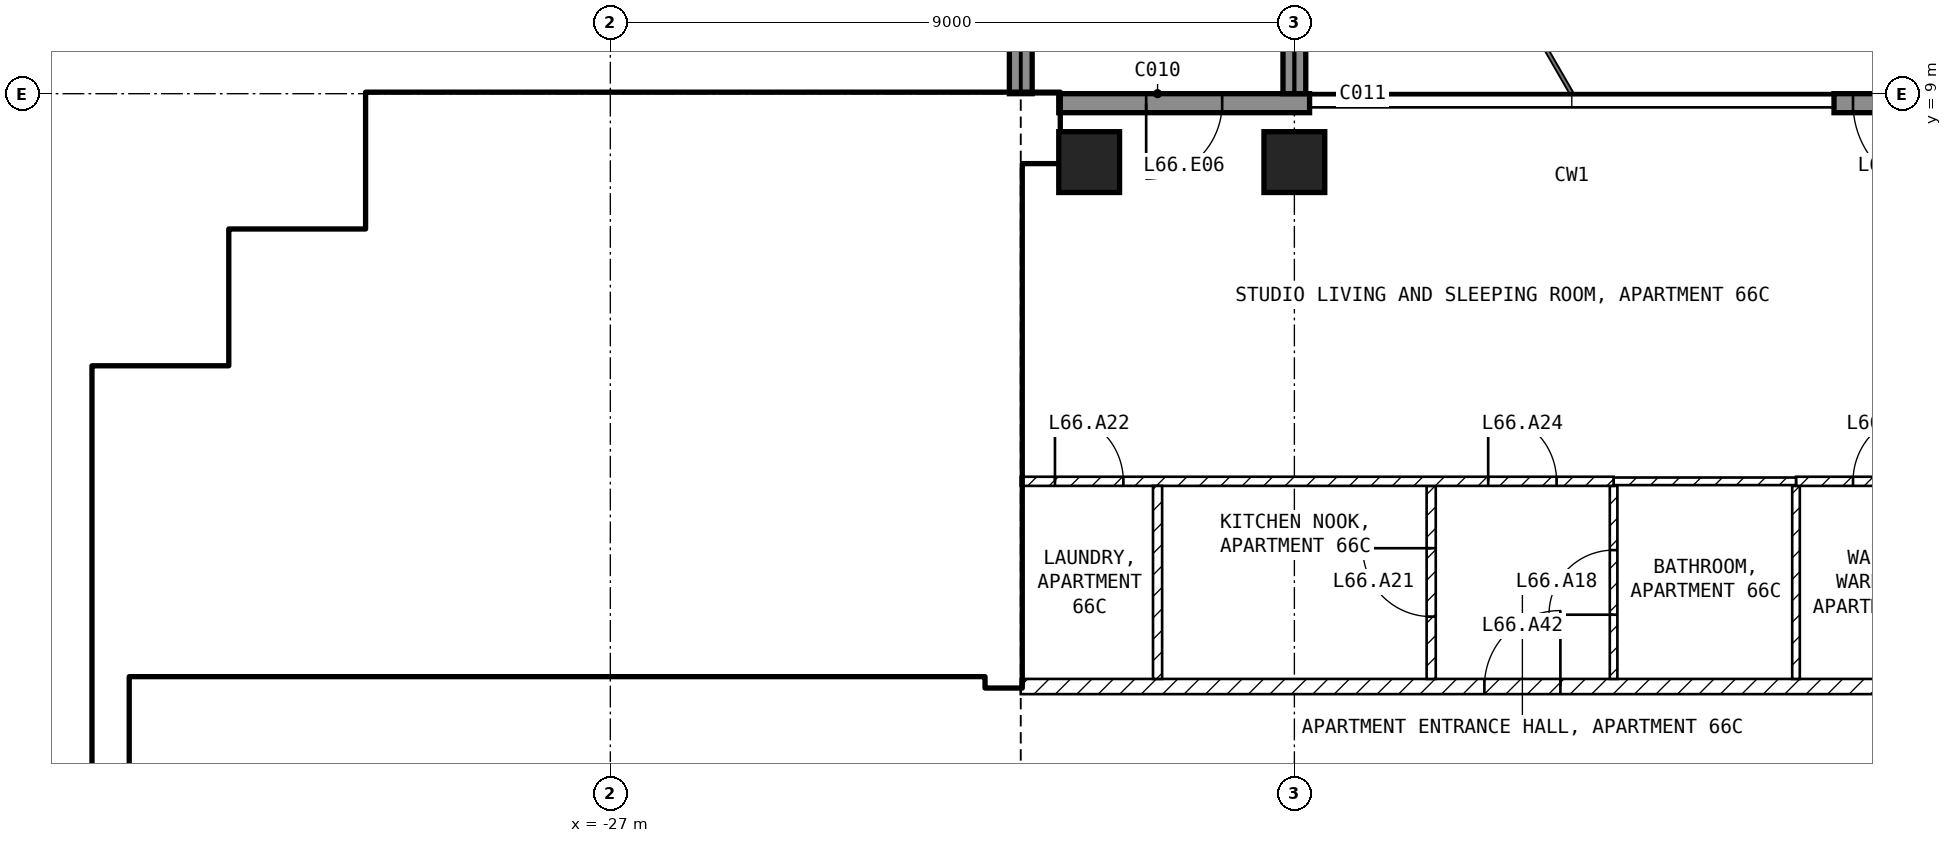
"""IFC4 building model, lengths in metres.
Left out: names, types, materials, properties, quantities, classifications, styles, units other than length and angle.
Written with IfcOpenShell. Run it as: python <this file> out.ifc"""

import sys

from ifc_helpers import new_model, si_unit, direction, frame, frame_2d, origin, origin_2d, place, context, subcontext, project, spatial, rectangle, extrude, element, fill, save


model = new_model("IFC4")
c1 = context("Model", 3, precision=1e-05, world=origin(), true_north=direction((0.0, 1.0)))
c2 = subcontext(c1, "Body", "Model", "MODEL_VIEW")
j1 = project(units=[si_unit("LENGTHUNIT", "METRE"), si_unit("PLANEANGLEUNIT", "RADIAN")], contexts=[c1])
p1 = place(None, origin())
s1 = spatial("IfcSite", under=j1, at=p1, CompositionType="ELEMENT")
p2 = place(p1, origin())
s2 = spatial("IfcBuilding", under=s1, at=p2, CompositionType="ELEMENT")
p3 = place(p2, frame((0.0, 0.0, 260.5)))
s3 = spatial("IfcBuildingStorey", under=s2, at=p3, CompositionType="ELEMENT", Elevation=260.5)
for number, where, z_axis, x_axis in (
    (1, (-20.7, 8.1, -0.25), (0.0, 0.0, 1.0), (1.0, 0.0, 0.0)),
    (2, (-18.0, 8.1, -0.25), (0.0, 0.0, 1.0), (1.0, 0.0, 0.0)),
):
    element("IfcColumn", number, at=place(p3, frame(where, z_axis=z_axis, x_axis=x_axis)), inside=s3, PredefinedType="COLUMN", context=c2, shape_type="SweptSolid", body=[
        extrude(rectangle(XDim=0.8, YDim=0.8, at=origin_2d()), origin(), (0.0, 0.0, 1.0), 3.5),
    ])
p4 = place(p3, frame((-9.06, 8.875, 0.0), z_axis=(0.0, 0.0, 1.0), x_axis=(-1.0, 0.0, 0.0)))
e3 = element("IfcWall", 3, at=p4, inside=s3, PredefinedType="SOLIDWALL", context=c2, shape_type="SweptSolid", body=[
    extrude(rectangle(XDim=1.84, YDim=0.25, at=frame_2d((0.92, 0.0))), origin(), (0.0, 0.0, 1.0), 3.25),
])
p5 = place(p4, frame((0.39, 0.0, 0.0)))
e4 = element("IfcOpeningElement", 4, at=p5, cuts=e3, PredefinedType="OPENING", context=c2, shape_type="SweptSolid", body=[
    extrude(rectangle(XDim=1.2, YDim=2.4, at=frame_2d((0.6, 1.2))), frame((0.0, 0.135, 0.0), z_axis=(0.0, -1.0, 0.0), x_axis=(1.0, 0.0, 0.0)), (0.0, 0.0, 1.0), 0.27),
])
p6 = place(p3, frame((-17.8, 8.875, 0.0), z_axis=(0.0, 0.0, 1.0), x_axis=(-1.0, 0.0, 0.0)))
e5 = element("IfcWall", 5, at=p6, inside=s3, PredefinedType="SOLIDWALL", context=c2, shape_type="SweptSolid", body=[
    extrude(rectangle(XDim=3.3, YDim=0.25, at=frame_2d((1.65, 0.0))), origin(), (0.0, 0.0, 1.0), 3.25),
])
p7 = place(p6, frame((1.15, 0.0, 0.0)))
e6 = element("IfcOpeningElement", 6, at=p7, cuts=e5, PredefinedType="OPENING", context=c2, shape_type="SweptSolid", body=[
    extrude(rectangle(XDim=1.0, YDim=2.4, at=frame_2d((0.5, 1.2))), frame((0.0, 0.135, 0.0), z_axis=(0.0, -1.0, 0.0), x_axis=(1.0, 0.0, 0.0)), (0.0, 0.0, 1.0), 0.27),
])
for number, where, z_axis, x_axis in (
    (7, (-21.6, 9.0, 0.0), (0.0, 0.0, 1.0), (0.0, 1.0, 0.0)),
    (8, (-18.0, 9.0, 0.0), (0.0, 0.0, 1.0), (0.0, 1.0, 0.0)),
):
    element("IfcWall", number, at=place(p3, frame(where, z_axis=z_axis, x_axis=x_axis)), inside=s3, PredefinedType="SOLIDWALL", context=c2, shape_type="SweptSolid", body=[
        extrude(rectangle(XDim=2.7, YDim=0.3, at=frame_2d((1.35, 0.0))), origin(), (0.0, 0.0, 1.0), 3.25),
    ])
p8 = place(p3, frame((-33.575, -4.95, 0.0), z_axis=(0.0, 0.0, 1.0), x_axis=(0.0, 1.0, 0.0)))
e9 = element("IfcWall", 9, at=p8, inside=s3, PredefinedType="SHEAR", context=c2, shape_type="SweptSolid", body=[
    extrude(rectangle(XDim=10.35, YDim=0.45, at=frame_2d((5.175, 0.0))), origin(), (0.0, 0.0, 1.0), 3.25),
])
for number, where, z_axis, x_axis in (
    (10, (-33.35, 5.175, 0.0), (0.0, 0.0, 1.0), (1.0, 0.0, 0.0)),
    (11, (-31.775, 5.4, 0.0), (0.0, 0.0, 1.0), (0.0, 1.0, 0.0)),
    (12, (-31.55, 6.975, 0.0), (0.0, 0.0, 1.0), (1.0, 0.0, 0.0)),
    (13, (-29.975, 7.2, 0.0), (0.0, 0.0, 1.0), (0.0, 1.0, 0.0)),
):
    element("IfcWall", number, at=place(p3, frame(where, z_axis=z_axis, x_axis=x_axis)), inside=s3, PredefinedType="SHEAR", context=c2, shape_type="SweptSolid", body=[
        extrude(rectangle(XDim=1.8, YDim=0.45, at=frame_2d((0.9, 0.0))), origin(), (0.0, 0.0, 1.0), 3.25),
    ])
p9 = place(p3, frame((-29.75, 8.55, 0.0), z_axis=(0.0, 0.0, 1.0), x_axis=(1.0, 0.0, 0.0)))
e14 = element("IfcWall", 14, at=p9, inside=s3, PredefinedType="SHEAR", context=c2, shape_type="SweptSolid", body=[
    extrude(rectangle(XDim=8.65, YDim=0.9, at=frame_2d((4.325, 0.0))), origin(), (0.0, 0.0, 1.0), 3.25),
])
p10 = place(p3, frame((-21.825, 1.2, 0.0), z_axis=(0.0, 0.0, 1.0), x_axis=(0.0, 1.0, 0.0)))
e15 = element("IfcWall", 15, at=p10, inside=s3, PredefinedType="SHEAR", context=c2, shape_type="SweptSolid", body=[
    extrude(rectangle(XDim=6.9, YDim=0.45, at=frame_2d((3.45, 0.0))), origin(), (0.0, 0.0, 1.0), 3.25),
])
p11 = place(p3, frame((-33.35, 1.45, 0.0), z_axis=(0.0, 0.0, 1.0), x_axis=(1.0, 0.0, 0.0)))
e16 = element("IfcWall", 16, at=p11, inside=s3, PredefinedType="SOLIDWALL", context=c2, shape_type="SweptSolid", body=[
    extrude(rectangle(XDim=11.3, YDim=0.2, at=frame_2d((5.65, 0.0))), origin(), (0.0, 0.0, 1.0), 3.25),
])
p12 = place(p11, frame((9.55, 0.0, 0.0)))
e17 = element("IfcOpeningElement", 17, at=p12, cuts=e16, PredefinedType="OPENING", context=c2, shape_type="SweptSolid", body=[
    extrude(rectangle(XDim=1.0, YDim=2.1, at=frame_2d((0.5, 1.05))), frame((0.0, 0.11, 0.0), z_axis=(0.0, -1.0, 0.0), x_axis=(1.0, 0.0, 0.0)), (0.0, 0.0, 1.0), 0.22),
])
p13 = place(p11, frame((7.05, 0.0, 0.0)))
e18 = element("IfcOpeningElement", 18, at=p13, cuts=e16, PredefinedType="OPENING", context=c2, shape_type="SweptSolid", body=[
    extrude(rectangle(XDim=1.0, YDim=2.1, at=frame_2d((0.5, 1.05))), frame((0.0, 0.11, 0.0), z_axis=(0.0, -1.0, 0.0), x_axis=(1.0, 0.0, 0.0)), (0.0, 0.0, 1.0), 0.22),
])
p14 = place(p11, frame((1.175, 0.0, 0.0)))
e19 = element("IfcOpeningElement", 19, at=p14, cuts=e16, PredefinedType="OPENING", context=c2, shape_type="SweptSolid", body=[
    extrude(rectangle(XDim=0.9, YDim=2.1, at=frame_2d((0.45, 1.05))), frame((0.0, 0.11, 0.0), z_axis=(0.0, -1.0, 0.0), x_axis=(1.0, 0.0, 0.0)), (0.0, 0.0, 1.0), 0.22),
])
p15 = place(p3, frame((-28.35, 5.15, 0.0), z_axis=(0.0, 0.0, 1.0), x_axis=(1.0, 0.0, 0.0)))
e20 = element("IfcWall", 20, at=p15, inside=s3, PredefinedType="SOLIDWALL", context=c2, shape_type="SweptSolid", body=[
    extrude(rectangle(XDim=6.3, YDim=0.2, at=frame_2d((3.15, 0.0))), origin(), (0.0, 0.0, 1.0), 3.25),
])
p16 = place(p15, frame((5.1, 0.0, 0.0)))
e21 = element("IfcOpeningElement", 21, at=p16, cuts=e20, PredefinedType="OPENING", context=c2, shape_type="SweptSolid", body=[
    extrude(rectangle(XDim=1.0, YDim=2.1, at=frame_2d((0.5, 1.05))), frame((0.0, 0.11, 0.0), z_axis=(0.0, -1.0, 0.0), x_axis=(1.0, 0.0, 0.0)), (0.0, 0.0, 1.0), 0.22),
])
p17 = place(p3, frame((-28.25, 5.25, 0.0), z_axis=(0.0, 0.0, 1.0), x_axis=(0.0, 1.0, 0.0)))
e22 = element("IfcWall", 22, at=p17, inside=s3, PredefinedType="SOLIDWALL", context=c2, shape_type="SweptSolid", body=[
    extrude(rectangle(XDim=2.85, YDim=0.2, at=frame_2d((1.425, 0.0))), origin(), (0.0, 0.0, 1.0), 3.25),
])
p18 = place(p3, frame((-33.35, 3.95, 0.0), z_axis=(0.0, 0.0, 1.0), x_axis=(1.0, 0.0, 0.0)))
e23 = element("IfcWall", 23, at=p18, inside=s3, PredefinedType="SOLIDWALL", context=c2, shape_type="SweptSolid", body=[
    extrude(rectangle(XDim=6.15, YDim=0.2, at=frame_2d((3.075, 0.0))), origin(), (0.0, 0.0, 1.0), 3.25),
])
p19 = place(p3, frame((-27.1, 1.55, 0.0), z_axis=(0.0, 0.0, 1.0), x_axis=(0.0, 1.0, 0.0)))
e24 = element("IfcWall", 24, at=p19, inside=s3, PredefinedType="SOLIDWALL", context=c2, shape_type="SweptSolid", body=[
    extrude(rectangle(XDim=3.5, YDim=0.2, at=frame_2d((1.75, 0.0))), origin(), (0.0, 0.0, 1.0), 3.25),
])
p20 = place(p19, frame((0.6, 0.0, 0.0)))
e25 = element("IfcOpeningElement", 25, at=p20, cuts=e24, PredefinedType="OPENING", context=c2, shape_type="SweptSolid", body=[
    extrude(rectangle(XDim=1.1, YDim=2.1, at=frame_2d((0.55, 1.05))), frame((0.0, 0.11, 0.0), z_axis=(0.0, -1.0, 0.0), x_axis=(1.0, 0.0, 0.0)), (0.0, 0.0, 1.0), 0.22),
])
p21 = place(p19, frame((2.6, 0.0, 0.0)))
e26 = element("IfcOpeningElement", 26, at=p21, cuts=e24, PredefinedType="OPENING", context=c2, shape_type="SweptSolid", body=[
    extrude(rectangle(XDim=0.8, YDim=2.1, at=frame_2d((0.4, 1.05))), frame((0.0, 0.11, 0.0), z_axis=(0.0, -1.0, 0.0), x_axis=(1.0, 0.0, 0.0)), (0.0, 0.0, 1.0), 0.22),
])
p22 = place(p3, frame((-30.0, 1.55, 0.0), z_axis=(0.0, 0.0, 1.0), x_axis=(0.0, 1.0, 0.0)))
e27 = element("IfcWall", 27, at=p22, inside=s3, PredefinedType="SOLIDWALL", context=c2, shape_type="SweptSolid", body=[
    extrude(rectangle(XDim=2.3, YDim=0.2, at=frame_2d((1.15, 0.0))), origin(), (0.0, 0.0, 1.0), 3.25),
])
p23 = place(p3, frame((-29.0, 4.05, 0.0), z_axis=(0.0, 0.0, 1.0), x_axis=(0.0, 1.0, 0.0)))
e28 = element("IfcWall", 28, at=p23, inside=s3, PredefinedType="PARTITIONING", context=c2, shape_type="SweptSolid", body=[
    extrude(rectangle(XDim=4.05, YDim=0.15, at=frame_2d((2.025, 0.0))), origin(), (0.0, 0.0, 1.0), 3.25),
])
p24 = place(p23, frame((0.1, 0.0, 0.0)))
e29 = element("IfcOpeningElement", 29, at=p24, cuts=e28, PredefinedType="OPENING", context=c2, shape_type="SweptSolid", body=[
    extrude(rectangle(XDim=0.8, YDim=2.1, at=frame_2d((0.4, 1.05))), frame((0.0, 0.085, 0.0), z_axis=(0.0, -1.0, 0.0), x_axis=(1.0, 0.0, 0.0)), (0.0, 0.0, 1.0), 0.17),
])
p25 = place(p3, frame((-21.6, 1.2, 0.0), z_axis=(0.0, 0.0, 1.0), x_axis=(1.0, 0.0, 0.0)))
e30 = element("IfcWall", 30, at=p25, inside=s3, PredefinedType="PARTITIONING", context=c2, shape_type="SweptSolid", body=[
    extrude(rectangle(XDim=17.2, YDim=0.2, at=frame_2d((8.6, 0.0))), origin(), (0.0, 0.0, 1.0), 3.25),
])
p26 = place(p25, frame((6.1, 0.0, 0.0)))
e31 = element("IfcOpeningElement", 31, at=p26, cuts=e30, PredefinedType="OPENING", context=c2, shape_type="SweptSolid", body=[
    extrude(rectangle(XDim=1.0, YDim=2.1, at=frame_2d((0.5, 1.05))), frame((0.0, 0.11, 0.0), z_axis=(0.0, -1.0, 0.0), x_axis=(1.0, 0.0, 0.0)), (0.0, 0.0, 1.0), 0.22),
])
p27 = place(p3, frame((-11.4, 1.3, 0.0), z_axis=(0.0, 0.0, 1.0), x_axis=(0.0, 1.0, 0.0)))
e32 = element("IfcWall", 32, at=p27, inside=s3, PredefinedType="PARTITIONING", context=c2, shape_type="SweptSolid", body=[
    extrude(rectangle(XDim=2.54, YDim=0.1, at=frame_2d((1.27, 0.0))), origin(), (0.0, 0.0, 1.0), 3.25),
])
p28 = place(p3, frame((-11.4, 3.9, 0.0), z_axis=(0.0, 0.0, 1.0), x_axis=(1.0, 0.0, 0.0)))
e33 = element("IfcWall", 33, at=p28, inside=s3, PredefinedType="PARTITIONING", context=c2, shape_type="SweptSolid", body=[
    extrude(rectangle(XDim=2.46, YDim=0.12, at=frame_2d((1.23, 0.0))), origin(), (0.0, 0.0, 1.0), 3.25),
])
p29 = place(p28, frame((0.75, 0.0, 0.0)))
e34 = element("IfcOpeningElement", 34, at=p29, cuts=e33, PredefinedType="OPENING", context=c2, shape_type="SweptSolid", body=[
    extrude(rectangle(XDim=0.9, YDim=2.1, at=frame_2d((0.45, 1.05))), frame((0.0, 0.07, 0.0), z_axis=(0.0, -1.0, 0.0), x_axis=(1.0, 0.0, 0.0)), (0.0, 0.0, 1.0), 0.14),
])
p30 = place(p3, frame((-13.8, 1.3, 0.0), z_axis=(0.0, 0.0, 1.0), x_axis=(0.0, 1.0, 0.0)))
e35 = element("IfcWall", 35, at=p30, inside=s3, PredefinedType="PARTITIONING", context=c2, shape_type="SweptSolid", body=[
    extrude(rectangle(XDim=2.54, YDim=0.1, at=frame_2d((1.27, 0.0))), origin(), (0.0, 0.0, 1.0), 3.25),
])
p31 = place(p30, frame((0.845, 0.0, 0.0)))
e36 = element("IfcOpeningElement", 36, at=p31, cuts=e35, PredefinedType="OPENING", context=c2, shape_type="SweptSolid", body=[
    extrude(rectangle(XDim=0.85, YDim=2.1, at=frame_2d((0.425, 1.05))), frame((0.0, 0.06, 0.0), z_axis=(0.0, -1.0, 0.0), x_axis=(1.0, 0.0, 0.0)), (0.0, 0.0, 1.0), 0.12),
])
p32 = place(p3, frame((-13.8, 3.9, 0.0), z_axis=(0.0, 0.0, 1.0), x_axis=(1.0, 0.0, 0.0)))
e37 = element("IfcWall", 37, at=p32, inside=s3, PredefinedType="PARTITIONING", context=c2, shape_type="SweptSolid", body=[
    extrude(rectangle(XDim=2.4, YDim=0.1, at=frame_2d((1.2, 0.0))), origin(), (0.0, 0.0, 1.0), 3.25),
])
p33 = place(p3, frame((-16.2, 1.3, 0.0), z_axis=(0.0, 0.0, 1.0), x_axis=(0.0, 1.0, 0.0)))
e38 = element("IfcWall", 38, at=p33, inside=s3, PredefinedType="PARTITIONING", context=c2, shape_type="SweptSolid", body=[
    extrude(rectangle(XDim=2.54, YDim=0.12, at=frame_2d((1.27, 0.0))), origin(), (0.0, 0.0, 1.0), 3.25),
])
p34 = place(p33, frame((0.82, 0.0, 0.0)))
e39 = element("IfcOpeningElement", 39, at=p34, cuts=e38, PredefinedType="OPENING", context=c2, shape_type="SweptSolid", body=[
    extrude(rectangle(XDim=0.9, YDim=2.1, at=frame_2d((0.45, 1.05))), frame((0.0, 0.07, 0.0), z_axis=(0.0, -1.0, 0.0), x_axis=(1.0, 0.0, 0.0)), (0.0, 0.0, 1.0), 0.14),
])
p35 = place(p3, frame((-21.6, 3.9, 0.0), z_axis=(0.0, 0.0, 1.0), x_axis=(1.0, 0.0, 0.0)))
e40 = element("IfcWall", 40, at=p35, inside=s3, PredefinedType="PARTITIONING", context=c2, shape_type="SweptSolid", body=[
    extrude(rectangle(XDim=7.8, YDim=0.12, at=frame_2d((3.9, 0.0))), origin(), (0.0, 0.0, 1.0), 3.25),
])
p36 = place(p35, frame((0.45, 0.0, 0.0)))
e41 = element("IfcOpeningElement", 41, at=p36, cuts=e40, PredefinedType="OPENING", context=c2, shape_type="SweptSolid", body=[
    extrude(rectangle(XDim=0.9, YDim=2.1, at=frame_2d((0.45, 1.05))), frame((0.0, 0.07, 0.0), z_axis=(0.0, -1.0, 0.0), x_axis=(1.0, 0.0, 0.0)), (0.0, 0.0, 1.0), 0.14),
])
p37 = place(p35, frame((6.15, 0.0, 0.0)))
e42 = element("IfcOpeningElement", 42, at=p37, cuts=e40, PredefinedType="OPENING", context=c2, shape_type="SweptSolid", body=[
    extrude(rectangle(XDim=0.9, YDim=2.1, at=frame_2d((0.45, 1.05))), frame((0.0, 0.07, 0.0), z_axis=(0.0, -1.0, 0.0), x_axis=(1.0, 0.0, 0.0)), (0.0, 0.0, 1.0), 0.14),
])
p38 = place(p3, frame((-19.8, 1.3, 0.0), z_axis=(0.0, 0.0, 1.0), x_axis=(0.0, 1.0, 0.0)))
e43 = element("IfcWall", 43, at=p38, inside=s3, PredefinedType="PARTITIONING", context=c2, shape_type="SweptSolid", body=[
    extrude(rectangle(XDim=2.54, YDim=0.12, at=frame_2d((1.27, 0.0))), origin(), (0.0, 0.0, 1.0), 3.25),
])
p39 = place(p5, origin())
e44 = element("IfcDoor", 44, at=p39, inside=s3, OperationType="SINGLE_SWING_LEFT", PredefinedType="DOOR", context=c2, shape_type="SweptSolid", body=[
    extrude(rectangle(XDim=1.2, YDim=2.4, at=frame_2d((0.6, 1.2))), frame((0.0, 0.025, 0.0), z_axis=(0.0, -1.0, 0.0), x_axis=(1.0, 0.0, 0.0)), (0.0, 0.0, 1.0), 0.05),
])
fill(e4, e44)
p40 = place(p7, origin())
e45 = element("IfcDoor", 45, at=p40, inside=s3, OperationType="SINGLE_SWING_RIGHT", PredefinedType="DOOR", context=c2, shape_type="SweptSolid", body=[
    extrude(rectangle(XDim=1.0, YDim=2.4, at=frame_2d((0.5, 1.2))), frame((0.0, 0.025, 0.0), z_axis=(0.0, -1.0, 0.0), x_axis=(1.0, 0.0, 0.0)), (0.0, 0.0, 1.0), 0.05),
])
fill(e6, e45)
p41 = place(p20, origin())
e46 = element("IfcDoor", 46, at=p41, inside=s3, OperationType="DOUBLE_DOOR_SLIDING", PredefinedType="DOOR", context=c2, shape_type="SweptSolid", body=[
    extrude(rectangle(XDim=1.1, YDim=2.1, at=frame_2d((0.55, 1.05))), frame((0.0, 0.025, 0.0), z_axis=(0.0, -1.0, 0.0), x_axis=(1.0, 0.0, 0.0)), (0.0, 0.0, 1.0), 0.05),
])
fill(e25, e46)
p42 = place(p16, origin())
e47 = element("IfcDoor", 47, at=p42, inside=s3, OperationType="SINGLE_SWING_LEFT", PredefinedType="DOOR", context=c2, shape_type="SweptSolid", body=[
    extrude(rectangle(XDim=1.0, YDim=2.1, at=frame_2d((0.5, 1.05))), frame((0.0, 0.025, 0.0), z_axis=(0.0, -1.0, 0.0), x_axis=(1.0, 0.0, 0.0)), (0.0, 0.0, 1.0), 0.05),
])
fill(e21, e47)
p43 = place(p12, origin())
e48 = element("IfcDoor", 48, at=p43, inside=s3, OperationType="SINGLE_SWING_LEFT", PredefinedType="DOOR", context=c2, shape_type="SweptSolid", body=[
    extrude(rectangle(XDim=1.0, YDim=2.1, at=frame_2d((0.5, 1.05))), frame((0.0, 0.025, 0.0), z_axis=(0.0, -1.0, 0.0), x_axis=(1.0, 0.0, 0.0)), (0.0, 0.0, 1.0), 0.05),
])
fill(e17, e48)
p44 = place(p13, origin())
e49 = element("IfcDoor", 49, at=p44, inside=s3, OperationType="SINGLE_SWING_LEFT", PredefinedType="DOOR", context=c2, shape_type="SweptSolid", body=[
    extrude(rectangle(XDim=1.0, YDim=2.1, at=frame_2d((0.5, 1.05))), frame((0.0, 0.025, 0.0), z_axis=(0.0, -1.0, 0.0), x_axis=(1.0, 0.0, 0.0)), (0.0, 0.0, 1.0), 0.05),
])
fill(e18, e49)
p45 = place(p21, origin())
e50 = element("IfcDoor", 50, at=p45, inside=s3, OperationType="SINGLE_SWING_LEFT", PredefinedType="DOOR", context=c2, shape_type="SweptSolid", body=[
    extrude(rectangle(XDim=0.8, YDim=2.1, at=frame_2d((0.4, 1.05))), frame((0.0, 0.025, 0.0), z_axis=(0.0, -1.0, 0.0), x_axis=(1.0, 0.0, 0.0)), (0.0, 0.0, 1.0), 0.05),
])
fill(e26, e50)
p46 = place(p24, origin())
e51 = element("IfcDoor", 51, at=p46, inside=s3, OperationType="SINGLE_SWING_LEFT", PredefinedType="DOOR", context=c2, shape_type="SweptSolid", body=[
    extrude(rectangle(XDim=0.8, YDim=2.1, at=frame_2d((0.4, 1.05))), frame((0.0, 0.025, 0.0), z_axis=(0.0, -1.0, 0.0), x_axis=(1.0, 0.0, 0.0)), (0.0, 0.0, 1.0), 0.05),
])
fill(e29, e51)
p47 = place(p14, origin())
e52 = element("IfcDoor", 52, at=p47, inside=s3, OperationType="SINGLE_SWING_LEFT", PredefinedType="DOOR", context=c2, shape_type="SweptSolid", body=[
    extrude(rectangle(XDim=0.9, YDim=2.1, at=frame_2d((0.45, 1.05))), frame((0.0, 0.025, 0.0), z_axis=(0.0, -1.0, 0.0), x_axis=(1.0, 0.0, 0.0)), (0.0, 0.0, 1.0), 0.05),
])
fill(e19, e52)
p48 = place(p31, origin())
e53 = element("IfcDoor", 53, at=p48, inside=s3, OperationType="SINGLE_SWING_LEFT", PredefinedType="DOOR", context=c2, shape_type="SweptSolid", body=[
    extrude(rectangle(XDim=0.85, YDim=2.1, at=frame_2d((0.425, 1.05))), frame((0.0, 0.025, 0.0), z_axis=(0.0, -1.0, 0.0), x_axis=(1.0, 0.0, 0.0)), (0.0, 0.0, 1.0), 0.05),
])
fill(e36, e53)
p49 = place(p34, origin())
e54 = element("IfcDoor", 54, at=p49, inside=s3, OperationType="SINGLE_SWING_RIGHT", PredefinedType="DOOR", context=c2, shape_type="SweptSolid", body=[
    extrude(rectangle(XDim=0.9, YDim=2.1, at=frame_2d((0.45, 1.05))), frame((0.0, 0.025, 0.0), z_axis=(0.0, -1.0, 0.0), x_axis=(1.0, 0.0, 0.0)), (0.0, 0.0, 1.0), 0.05),
])
fill(e39, e54)
p50 = place(p36, origin())
e55 = element("IfcDoor", 55, at=p50, inside=s3, OperationType="SINGLE_SWING_LEFT", PredefinedType="DOOR", context=c2, shape_type="SweptSolid", body=[
    extrude(rectangle(XDim=0.9, YDim=2.1, at=frame_2d((0.45, 1.05))), frame((0.0, 0.025, 0.0), z_axis=(0.0, -1.0, 0.0), x_axis=(1.0, 0.0, 0.0)), (0.0, 0.0, 1.0), 0.05),
])
fill(e41, e55)
p51 = place(p37, origin())
e56 = element("IfcDoor", 56, at=p51, inside=s3, OperationType="SINGLE_SWING_LEFT", PredefinedType="DOOR", context=c2, shape_type="SweptSolid", body=[
    extrude(rectangle(XDim=0.9, YDim=2.1, at=frame_2d((0.45, 1.05))), frame((0.0, 0.025, 0.0), z_axis=(0.0, -1.0, 0.0), x_axis=(1.0, 0.0, 0.0)), (0.0, 0.0, 1.0), 0.05),
])
fill(e42, e56)
p52 = place(p29, origin())
e57 = element("IfcDoor", 57, at=p52, inside=s3, OperationType="SINGLE_SWING_RIGHT", PredefinedType="DOOR", context=c2, shape_type="SweptSolid", body=[
    extrude(rectangle(XDim=0.9, YDim=2.1, at=frame_2d((0.45, 1.05))), frame((0.0, 0.025, 0.0), z_axis=(0.0, -1.0, 0.0), x_axis=(1.0, 0.0, 0.0)), (0.0, 0.0, 1.0), 0.05),
])
fill(e34, e57)
p53 = place(p26, origin())
e58 = element("IfcDoor", 58, at=p53, inside=s3, OperationType="SINGLE_SWING_RIGHT", PredefinedType="DOOR", context=c2, shape_type="SweptSolid", body=[
    extrude(rectangle(XDim=1.0, YDim=2.1, at=frame_2d((0.5, 1.05))), frame((0.0, 0.025, 0.0), z_axis=(0.0, -1.0, 0.0), x_axis=(1.0, 0.0, 0.0)), (0.0, 0.0, 1.0), 0.05),
])
fill(e31, e58)
save(model, sys.argv[1])
